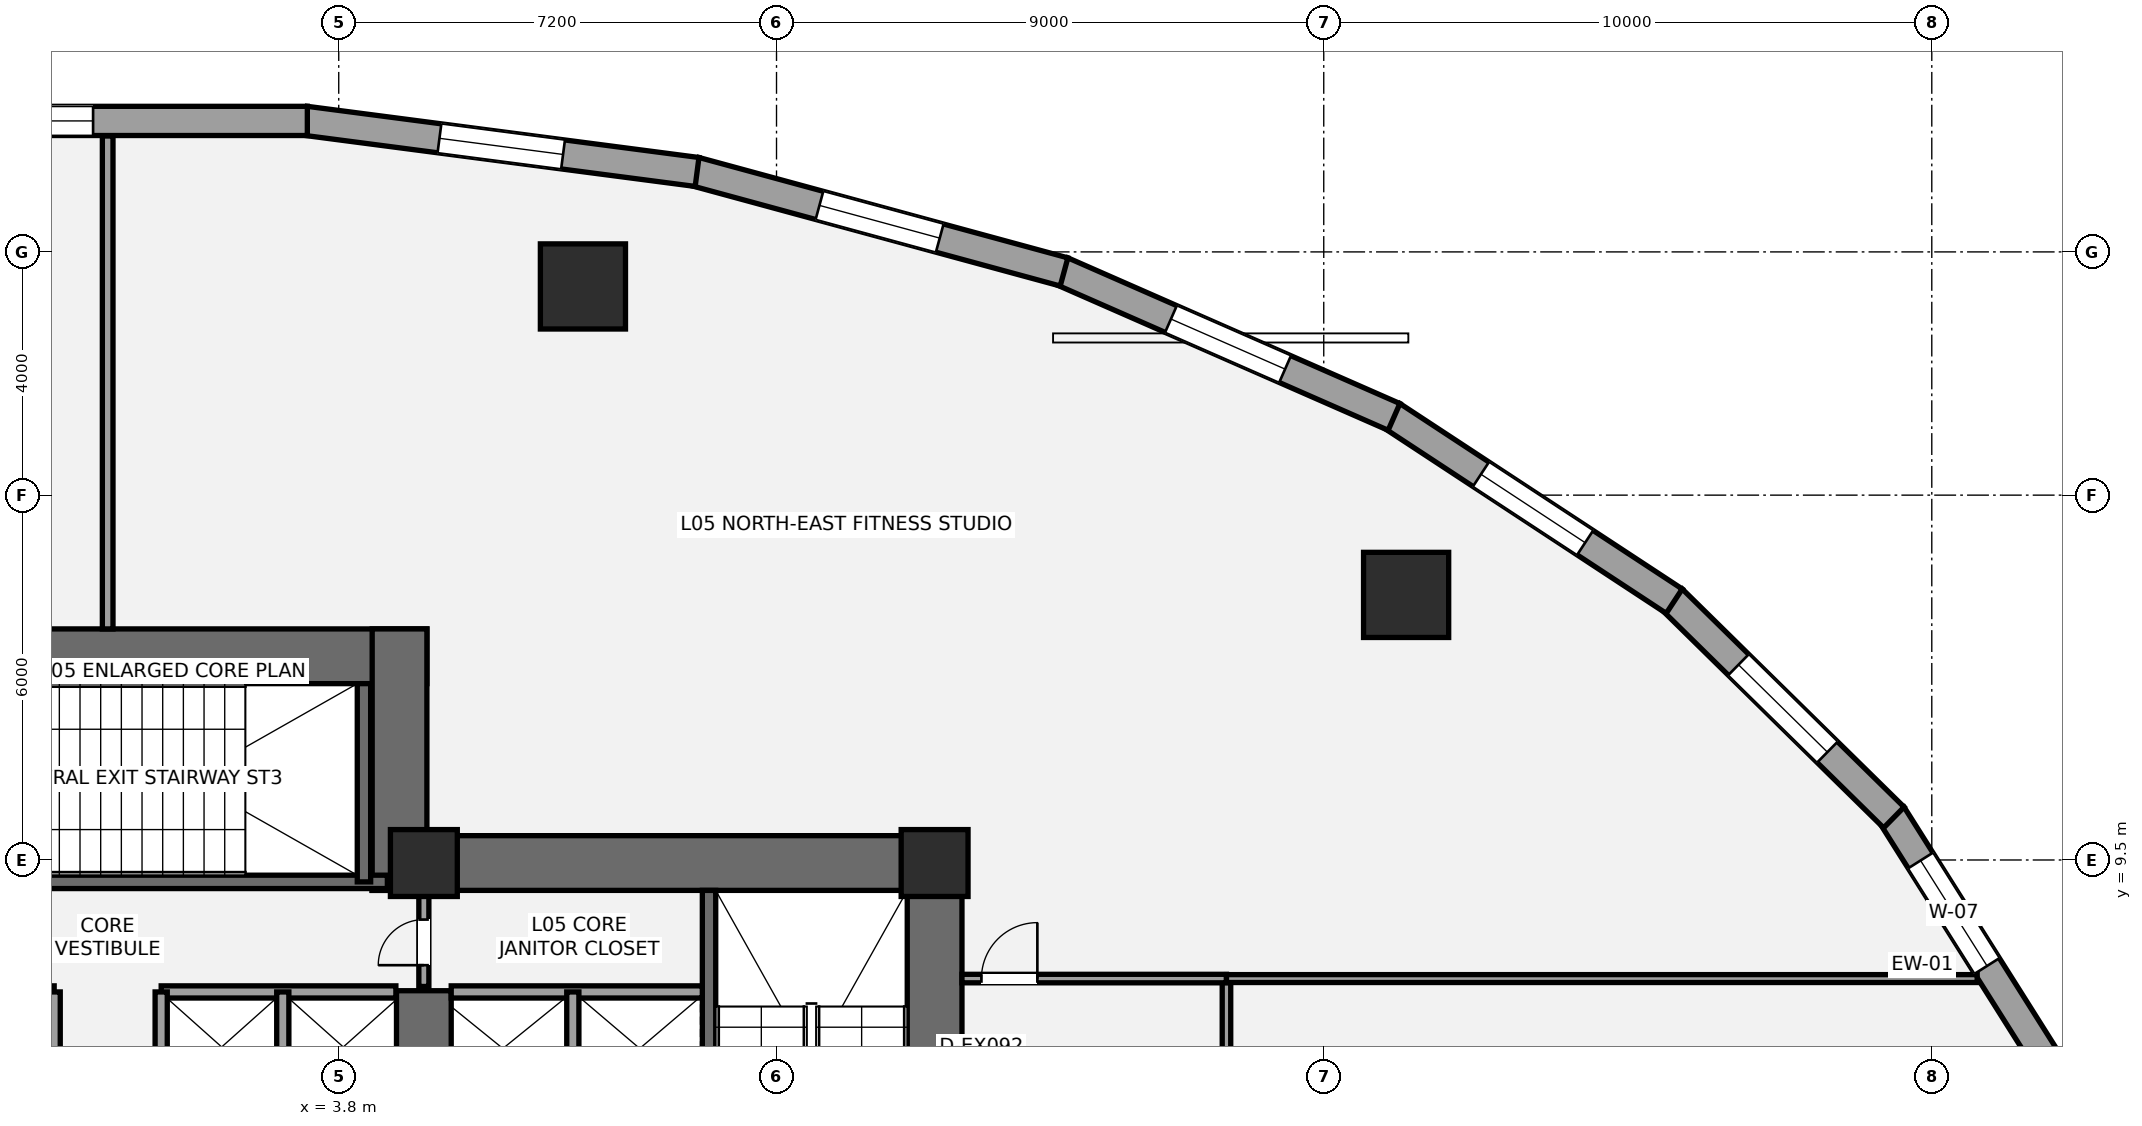
"""IFC4 building model, lengths in metres.
Left out: names, types, materials, properties, quantities, classifications, styles, units other than length and angle.
Written with IfcOpenShell. Run it as: python <this file> out.ifc"""

import sys

from ifc_helpers import new_model, si_unit, direction, frame, frame_2d, origin, origin_2d, place, context, subcontext, project, spatial, rectangle, hollow_circle, extrude, element, fill, save


model = new_model("IFC4")
c1 = context("Model", 3, precision=1e-05, world=origin(), true_north=direction((0.0, 1.0)))
c2 = subcontext(c1, "Body", "Model", "MODEL_VIEW")
j1 = project(units=[si_unit("LENGTHUNIT", "METRE"), si_unit("PLANEANGLEUNIT", "RADIAN")], contexts=[c1])
p1 = place(None, origin())
s1 = spatial("IfcSite", under=j1, at=p1, CompositionType="ELEMENT")
p2 = place(p1, origin())
s2 = spatial("IfcBuilding", under=s1, at=p2, CompositionType="ELEMENT")
p3 = place(p2, frame((0.0, 0.0, 22.8)))
s3 = spatial("IfcBuildingStorey", under=s2, at=p3, CompositionType="ELEMENT", Elevation=22.8)
p4 = place(p3, frame((13.6, 0.95, 0.0), z_axis=(0.0, 0.0, 1.0), x_axis=(0.0, 1.0, 0.0)))
e1 = element("IfcWall", 1, at=p4, inside=s3, PredefinedType="SHEAR", context=c2, shape_type="SweptSolid", body=[
    extrude(rectangle(XDim=8.95, YDim=0.9, at=frame_2d((4.475, 0.0))), origin(), (0.0, 0.0, 1.0), 4.2),
])
p5 = place(p3, frame((4.35, 9.45, 0.0), z_axis=(0.0, 0.0, 1.0), x_axis=(1.0, 0.0, 0.0)))
e2 = element("IfcWall", 2, at=p5, inside=s3, PredefinedType="SHEAR", context=c2, shape_type="SweptSolid", body=[
    extrude(rectangle(XDim=9.7, YDim=0.9, at=frame_2d((4.85, 0.0))), origin(), (0.0, 0.0, 1.0), 4.2),
])
p6 = place(p3, frame((5.2, 5.35, 0.0), z_axis=(0.0, 0.0, 1.0), x_axis=(0.0, 1.0, 0.0)))
e3 = element("IfcWall", 3, at=p6, inside=s3, PredefinedType="SHEAR", context=c2, shape_type="SweptSolid", body=[
    extrude(rectangle(XDim=2.0, YDim=0.9, at=frame_2d((1.0, 0.0))), origin(), (0.0, 0.0, 1.0), 4.2),
])
p7 = place(p3, frame((9.89, 1.85, 0.0), z_axis=(0.0, 0.0, 1.0), x_axis=(0.0, 1.0, 0.0)))
e4 = element("IfcWall", 4, at=p7, inside=s3, PredefinedType="SHEAR", context=c2, shape_type="SweptSolid", body=[
    extrude(rectangle(XDim=7.15, YDim=0.22, at=frame_2d((3.575, 0.0))), origin(), (0.0, 0.0, 1.0), 4.2),
])
p8 = place(p3, frame((-5.25, 12.85, 0.0), z_axis=(0.0, 0.0, 1.0), x_axis=(1.0, 0.0, 0.0)))
e5 = element("IfcWall", 5, at=p8, inside=s3, PredefinedType="SHEAR", context=c2, shape_type="SweptSolid", body=[
    extrude(rectangle(XDim=10.5, YDim=0.9, at=frame_2d((5.25, 0.0))), origin(), (0.0, 0.0, 1.0), 4.2),
])
p9 = place(p3, frame((4.8, 9.0, 0.0), z_axis=(0.0, 0.0, 1.0), x_axis=(0.0, 1.0, 0.0)))
e6 = element("IfcWall", 6, at=p9, inside=s3, PredefinedType="SHEAR", context=c2, shape_type="SweptSolid", body=[
    extrude(rectangle(XDim=4.3, YDim=0.9, at=frame_2d((2.15, 0.0))), origin(), (0.0, 0.0, 1.0), 4.2),
])
p10 = place(p3, frame((-4.7, 9.14, 0.0), z_axis=(0.0, 0.0, 1.0), x_axis=(1.0, 0.0, 0.0)))
e7 = element("IfcWall", 7, at=p10, inside=s3, PredefinedType="SHEAR", context=c2, shape_type="SweptSolid", body=[
    extrude(rectangle(XDim=9.3, YDim=0.22, at=frame_2d((4.65, 0.0))), origin(), (0.0, 0.0, 1.0), 4.2),
])
p11 = place(p10, frame((1.15, 0.0, 0.0)))
e8 = element("IfcOpeningElement", 8, at=p11, cuts=e7, PredefinedType="OPENING", context=c2, shape_type="SweptSolid", body=[
    extrude(rectangle(XDim=1.05, YDim=2.15, at=frame_2d((0.525, 1.075))), frame((0.0, 0.12, 0.0), z_axis=(0.0, -1.0, 0.0), x_axis=(1.0, 0.0, 0.0)), (0.0, 0.0, 1.0), 0.24),
])
p12 = place(p3, frame((4.215, 9.14, 0.0), z_axis=(0.0, 0.0, 1.0), x_axis=(0.0, 1.0, 0.0)))
e9 = element("IfcWall", 9, at=p12, inside=s3, PredefinedType="SHEAR", context=c2, shape_type="SweptSolid", body=[
    extrude(rectangle(XDim=3.26, YDim=0.22, at=frame_2d((1.63, 0.0))), origin(), (0.0, 0.0, 1.0), 4.2),
])
for number, where, z_axis, x_axis in (
    (10, (5.2, 9.45, 0.0), (0.0, 0.0, 1.0), (1.0, 0.0, 0.0)),
    (11, (13.6, 9.45, 0.0), (0.0, 0.0, 1.0), (1.0, 0.0, 0.0)),
):
    element("IfcColumn", number, at=place(p3, frame(where, z_axis=z_axis, x_axis=x_axis)), inside=s3, PredefinedType="COLUMN", context=c2, shape_type="SweptSolid", body=[
        extrude(rectangle(XDim=1.1, YDim=1.1, at=origin_2d()), origin(), (0.0, 0.0, 1.0), 4.2),
    ])
for number, where, z_axis, x_axis in (
    (12, (21.354, 13.859, 0.0), (0.0, 0.0, 1.0), (1.0, 0.0, 0.0)),
    (13, (7.816, 18.932, 0.0), (0.0, 0.0, 1.0), (1.0, 0.0, 0.0)),
):
    element("IfcColumn", number, at=place(p3, frame(where, z_axis=z_axis, x_axis=x_axis)), inside=s3, PredefinedType="USERDEFINED", context=c2, shape_type="SweptSolid", body=[
        extrude(hollow_circle(Radius=0.7, WallThickness=0.05, at=origin_2d()), origin(), (0.0, 0.0, 1.0), 4.13),
    ])
p13 = place(p3, frame((29.341, 10.243, 0.0), z_axis=(0.0, 0.0, 1.0), x_axis=(0.53349762721, -0.845801561693, 0.0)))
e14 = element("IfcWall", 14, at=p13, inside=s3, PredefinedType="STANDARD", context=c2, shape_type="SweptSolid", body=[
    extrude(rectangle(XDim=4.711, YDim=0.48, at=frame_2d((2.355, 0.0))), origin(), (0.0, 0.0, 1.0), 3.033),
])
p14 = place(p13, frame((0.888, 0.0, 0.72)))
e15 = element("IfcOpeningElement", 15, at=p14, cuts=e14, PredefinedType="OPENING", context=c2, shape_type="SweptSolid", body=[
    extrude(rectangle(XDim=2.05, YDim=1.8, at=frame_2d((1.025, 0.9))), frame((0.0, 0.25, 0.0), z_axis=(0.0, -1.0, 0.0), x_axis=(1.0, 0.0, 0.0)), (0.0, 0.0, 1.0), 0.5),
])
p15 = place(p3, frame((25.728, 13.785, 0.0), z_axis=(0.0, 0.0, 1.0), x_axis=(0.713189080178, -0.700971708355, 0.0)))
e16 = element("IfcWall", 16, at=p15, inside=s3, PredefinedType="STANDARD", context=c2, shape_type="SweptSolid", body=[
    extrude(rectangle(XDim=5.116, YDim=0.48, at=frame_2d((2.558, 0.0))), origin(), (0.0, 0.0, 1.0), 3.033),
])
p16 = place(p15, frame((1.533, 0.0, 0.72)))
e17 = element("IfcOpeningElement", 17, at=p16, cuts=e16, PredefinedType="OPENING", context=c2, shape_type="SweptSolid", body=[
    extrude(rectangle(XDim=2.05, YDim=1.8, at=frame_2d((1.025, 0.9))), frame((0.0, 0.25, 0.0), z_axis=(0.0, -1.0, 0.0), x_axis=(1.0, 0.0, 0.0)), (0.0, 0.0, 1.0), 0.5),
])
p17 = place(p3, frame((21.121, 16.806, 0.0), z_axis=(0.0, 0.0, 1.0), x_axis=(0.835863918172, -0.548936708827, 0.0)))
e18 = element("IfcWall", 18, at=p17, inside=s3, PredefinedType="STANDARD", context=c2, shape_type="SweptSolid", body=[
    extrude(rectangle(XDim=5.555, YDim=0.48, at=frame_2d((2.778, 0.0))), origin(), (0.0, 0.0, 1.0), 3.033),
])
p18 = place(p17, frame((1.753, 0.0, 0.72)))
e19 = element("IfcOpeningElement", 19, at=p18, cuts=e18, PredefinedType="OPENING", context=c2, shape_type="SweptSolid", body=[
    extrude(rectangle(XDim=2.05, YDim=1.8, at=frame_2d((1.025, 0.9))), frame((0.0, 0.25, 0.0), z_axis=(0.0, -1.0, 0.0), x_axis=(1.0, 0.0, 0.0)), (0.0, 0.0, 1.0), 0.5),
])
p19 = place(p3, frame((15.695, 19.183, 0.0), z_axis=(0.0, 0.0, 1.0), x_axis=(0.91570760638, -0.401845218484, 0.0)))
e20 = element("IfcWall", 20, at=p19, inside=s3, PredefinedType="STANDARD", context=c2, shape_type="SweptSolid", body=[
    extrude(rectangle(XDim=5.963, YDim=0.48, at=frame_2d((2.981, 0.0))), origin(), (0.0, 0.0, 1.0), 3.033),
])
p20 = place(p19, frame((1.957, 0.0, 0.72)))
e21 = element("IfcOpeningElement", 21, at=p20, cuts=e20, PredefinedType="OPENING", context=c2, shape_type="SweptSolid", body=[
    extrude(rectangle(XDim=2.05, YDim=1.8, at=frame_2d((1.025, 0.9))), frame((0.0, 0.25, 0.0), z_axis=(0.0, -1.0, 0.0), x_axis=(1.0, 0.0, 0.0)), (0.0, 0.0, 1.0), 0.5),
])
p21 = place(p3, frame((9.662, 20.821, 0.0), z_axis=(0.0, 0.0, 1.0), x_axis=(0.964936550718, -0.262483243445, 0.0)))
e22 = element("IfcWall", 22, at=p21, inside=s3, PredefinedType="STANDARD", context=c2, shape_type="SweptSolid", body=[
    extrude(rectangle(XDim=6.288, YDim=0.48, at=frame_2d((3.144, 0.0))), origin(), (0.0, 0.0, 1.0), 3.033),
])
p22 = place(p21, frame((2.119, 0.0, 0.72)))
e23 = element("IfcOpeningElement", 23, at=p22, cuts=e22, PredefinedType="OPENING", context=c2, shape_type="SweptSolid", body=[
    extrude(rectangle(XDim=2.05, YDim=1.8, at=frame_2d((1.025, 0.9))), frame((0.0, 0.25, 0.0), z_axis=(0.0, -1.0, 0.0), x_axis=(1.0, 0.0, 0.0)), (0.0, 0.0, 1.0), 0.5),
])
p23 = place(p3, frame((3.252, 21.656, 0.0), z_axis=(0.0, 0.0, 1.0), x_axis=(0.991576921472, -0.129519144545, 0.0)))
e24 = element("IfcWall", 24, at=p23, inside=s3, PredefinedType="STANDARD", context=c2, shape_type="SweptSolid", body=[
    extrude(rectangle(XDim=6.496, YDim=0.48, at=frame_2d((3.248, 0.0))), origin(), (0.0, 0.0, 1.0), 3.033),
])
p24 = place(p23, frame((2.223, 0.0, 0.72)))
e25 = element("IfcOpeningElement", 25, at=p24, cuts=e24, PredefinedType="OPENING", context=c2, shape_type="SweptSolid", body=[
    extrude(rectangle(XDim=2.05, YDim=1.8, at=frame_2d((1.025, 0.9))), frame((0.0, 0.25, 0.0), z_axis=(0.0, -1.0, 0.0), x_axis=(1.0, 0.0, 0.0)), (0.0, 0.0, 1.0), 0.5),
])
p25 = place(p3, frame((-3.284, 21.654, 0.0), z_axis=(0.0, 0.0, 1.0), x_axis=(1.0, 0.0, 0.0)))
e26 = element("IfcWall", 26, at=p25, inside=s3, PredefinedType="STANDARD", context=c2, shape_type="SweptSolid", body=[
    extrude(rectangle(XDim=6.567, YDim=0.48, at=frame_2d((3.284, 0.0))), origin(), (0.0, 0.0, 1.0), 3.033),
])
p26 = place(p25, frame((0.994, 0.0, 0.72)))
e27 = element("IfcOpeningElement", 27, at=p26, cuts=e26, PredefinedType="OPENING", context=c2, shape_type="SweptSolid", body=[
    extrude(rectangle(XDim=2.05, YDim=1.8, at=frame_2d((1.025, 0.9))), frame((0.0, 0.25, 0.0), z_axis=(0.0, -1.0, 0.0), x_axis=(1.0, 0.0, 0.0)), (0.0, 0.0, 1.0), 0.5),
])
p27 = place(p3, frame((5.65, 7.33, 0.0), z_axis=(0.0, 0.0, 1.0), x_axis=(1.0, 0.0, 0.0)))
e28 = element("IfcWall", 28, at=p27, inside=s3, PredefinedType="SOLIDWALL", context=c2, shape_type="SweptSolid", body=[
    extrude(rectangle(XDim=4.13, YDim=0.2, at=frame_2d((2.065, 0.0))), origin(), (0.0, 0.0, 1.0), 3.9),
])
p28 = place(p3, frame((7.65, 5.47, 0.0), z_axis=(0.0, 0.0, 1.0), x_axis=(0.0, 1.0, 0.0)))
e29 = element("IfcWall", 29, at=p28, inside=s3, PredefinedType="SOLIDWALL", context=c2, shape_type="SweptSolid", body=[
    extrude(rectangle(XDim=1.86, YDim=0.2, at=frame_2d((0.93, 0.0))), origin(), (0.0, 0.0, 1.0), 3.9),
])
for number, where, z_axis, x_axis in (
    (30, (-4.74, 7.33, 0.0), (0.0, 0.0, 1.0), (1.0, 0.0, 0.0)),
    (31, (0.88, 7.33, 0.0), (0.0, 0.0, 1.0), (1.0, 0.0, 0.0)),
):
    element("IfcWall", number, at=place(p3, frame(where, z_axis=z_axis, x_axis=x_axis)), inside=s3, PredefinedType="SOLIDWALL", context=c2, shape_type="SweptSolid", body=[
        extrude(rectangle(XDim=3.86, YDim=0.2, at=frame_2d((1.93, 0.0))), origin(), (0.0, 0.0, 1.0), 3.9),
    ])
for number, where, z_axis, x_axis in (
    (32, (2.88, 5.52, 0.0), (0.0, 0.0, 1.0), (0.0, 1.0, 0.0)),
    (33, (-0.88, 5.52, 0.0), (0.0, 0.0, 1.0), (0.0, 1.0, 0.0)),
    (34, (0.88, 5.52, 0.0), (0.0, 0.0, 1.0), (0.0, 1.0, 0.0)),
):
    element("IfcWall", number, at=place(p3, frame(where, z_axis=z_axis, x_axis=x_axis)), inside=s3, PredefinedType="SOLIDWALL", context=c2, shape_type="SweptSolid", body=[
        extrude(rectangle(XDim=1.81, YDim=0.2, at=frame_2d((0.905, 0.0))), origin(), (0.0, 0.0, 1.0), 3.9),
    ])
p29 = place(p3, frame((5.2, 7.42, 0.0), z_axis=(0.0, 0.0, 1.0), x_axis=(0.0, 1.0, 0.0)))
e35 = element("IfcWall", 35, at=p29, inside=s3, PredefinedType="PARTITIONING", context=c2, shape_type="SweptSolid", body=[
    extrude(rectangle(XDim=1.58, YDim=0.165, at=frame_2d((0.79, 0.0))), origin(), (0.0, 0.0, 1.0), 3.9),
])
p30 = place(p29, frame((0.35, 0.0, 0.0)))
e36 = element("IfcOpeningElement", 36, at=p30, cuts=e35, PredefinedType="OPENING", context=c2, shape_type="SweptSolid", body=[
    extrude(rectangle(XDim=0.75, YDim=2.1, at=frame_2d((0.375, 1.05))), frame((0.0, 0.093, 0.0), z_axis=(0.0, -1.0, 0.0), x_axis=(1.0, 0.0, 0.0)), (0.0, 0.0, 1.0), 0.185),
])
p31 = place(p3, frame((18.4, -17.725, 0.0), z_axis=(0.0, 0.0, 1.0), x_axis=(0.0, 1.0, 0.0)))
e37 = element("IfcWall", 37, at=p31, inside=s3, PredefinedType="PARTITIONING", context=c2, shape_type="SweptSolid", body=[
    extrude(rectangle(XDim=25.275, YDim=0.14, at=frame_2d((12.637, 0.0))), origin(), (0.0, 0.0, 1.0), 2.09),
])
p32 = place(p31, frame((15.225, 0.0, 0.0)))
e38 = element("IfcOpeningElement", 38, at=p32, cuts=e37, PredefinedType="OPENING", context=c2, shape_type="SweptSolid", body=[
    extrude(rectangle(XDim=0.85, YDim=2.0, at=frame_2d((0.425, 1.0))), frame((0.0, 0.08, 0.0), z_axis=(0.0, -1.0, 0.0), x_axis=(1.0, 0.0, 0.0)), (0.0, 0.0, 1.0), 0.16),
])
p33 = place(p31, frame((22.05, 0.0, 0.0)))
e39 = element("IfcOpeningElement", 39, at=p33, cuts=e37, PredefinedType="OPENING", context=c2, shape_type="SweptSolid", body=[
    extrude(rectangle(XDim=0.85, YDim=2.0, at=frame_2d((0.425, 1.0))), frame((0.0, 0.08, 0.0), z_axis=(0.0, -1.0, 0.0), x_axis=(1.0, 0.0, 0.0)), (0.0, 0.0, 1.0), 0.16),
])
p34 = place(p3, frame((14.05, 7.55, 0.0), z_axis=(0.0, 0.0, 1.0), x_axis=(1.0, 0.0, 0.0)))
e40 = element("IfcWall", 40, at=p34, inside=s3, PredefinedType="PARTITIONING", context=c2, shape_type="SweptSolid", body=[
    extrude(rectangle(XDim=4.35, YDim=0.14, at=frame_2d((2.175, 0.0))), origin(), (0.0, 0.0, 1.0), 3.9),
])
p35 = place(p34, frame((0.32, 0.0, 0.0)))
e41 = element("IfcOpeningElement", 41, at=p35, cuts=e40, PredefinedType="OPENING", context=c2, shape_type="SweptSolid", body=[
    extrude(rectangle(XDim=0.92, YDim=2.15, at=frame_2d((0.46, 1.075))), frame((0.0, 0.08, 0.0), z_axis=(0.0, -1.0, 0.0), x_axis=(1.0, 0.0, 0.0)), (0.0, 0.0, 1.0), 0.16),
])
p36 = place(p3, frame((0.0, 13.3, 0.0), z_axis=(0.0, 0.0, 1.0), x_axis=(0.0, 1.0, 0.0)))
e42 = element("IfcWall", 42, at=p36, inside=s3, PredefinedType="PARTITIONING", context=c2, shape_type="SweptSolid", body=[
    extrude(rectangle(XDim=8.106, YDim=0.175, at=frame_2d((4.053, 0.0))), origin(), (0.0, 0.0, 1.0), 2.09),
])
p37 = place(p3, frame((18.4, 7.55, 0.0), z_axis=(0.0, 0.0, 1.0), x_axis=(1.0, 0.0, 0.0)))
e43 = element("IfcWall", 43, at=p37, inside=s3, PredefinedType="PARTITIONING", context=c2, shape_type="SweptSolid", body=[
    extrude(rectangle(XDim=12.347, YDim=0.13, at=frame_2d((6.173, 0.0))), origin(), (0.0, 0.0, 1.0), 2.09),
])
p38 = place(p14, origin())
e44 = element("IfcWindow", 44, at=p38, inside=s3, PartitioningType="SINGLE_PANEL", PredefinedType="WINDOW", context=c2, shape_type="SweptSolid", body=[
    extrude(rectangle(XDim=2.05, YDim=1.8, at=frame_2d((1.025, 0.9))), frame((0.0, -0.01, 0.0), z_axis=(0.0, -1.0, 0.0), x_axis=(1.0, 0.0, 0.0)), (0.0, 0.0, 1.0), 0.06),
])
fill(e15, e44)
p39 = place(p16, origin())
e45 = element("IfcWindow", 45, at=p39, inside=s3, PartitioningType="SINGLE_PANEL", PredefinedType="WINDOW", context=c2, shape_type="SweptSolid", body=[
    extrude(rectangle(XDim=2.05, YDim=1.8, at=frame_2d((1.025, 0.9))), frame((0.0, -0.01, 0.0), z_axis=(0.0, -1.0, 0.0), x_axis=(1.0, 0.0, 0.0)), (0.0, 0.0, 1.0), 0.06),
])
fill(e17, e45)
p40 = place(p18, origin())
e46 = element("IfcWindow", 46, at=p40, inside=s3, PartitioningType="SINGLE_PANEL", PredefinedType="WINDOW", context=c2, shape_type="SweptSolid", body=[
    extrude(rectangle(XDim=2.05, YDim=1.8, at=frame_2d((1.025, 0.9))), frame((0.0, -0.01, 0.0), z_axis=(0.0, -1.0, 0.0), x_axis=(1.0, 0.0, 0.0)), (0.0, 0.0, 1.0), 0.06),
])
fill(e19, e46)
p41 = place(p20, origin())
e47 = element("IfcWindow", 47, at=p41, inside=s3, PartitioningType="SINGLE_PANEL", PredefinedType="WINDOW", context=c2, shape_type="SweptSolid", body=[
    extrude(rectangle(XDim=2.05, YDim=1.8, at=frame_2d((1.025, 0.9))), frame((0.0, -0.01, 0.0), z_axis=(0.0, -1.0, 0.0), x_axis=(1.0, 0.0, 0.0)), (0.0, 0.0, 1.0), 0.06),
])
fill(e21, e47)
p42 = place(p22, origin())
e48 = element("IfcWindow", 48, at=p42, inside=s3, PartitioningType="SINGLE_PANEL", PredefinedType="WINDOW", context=c2, shape_type="SweptSolid", body=[
    extrude(rectangle(XDim=2.05, YDim=1.8, at=frame_2d((1.025, 0.9))), frame((0.0, -0.01, 0.0), z_axis=(0.0, -1.0, 0.0), x_axis=(1.0, 0.0, 0.0)), (0.0, 0.0, 1.0), 0.06),
])
fill(e23, e48)
p43 = place(p24, origin())
e49 = element("IfcWindow", 49, at=p43, inside=s3, PartitioningType="SINGLE_PANEL", PredefinedType="WINDOW", context=c2, shape_type="SweptSolid", body=[
    extrude(rectangle(XDim=2.05, YDim=1.8, at=frame_2d((1.025, 0.9))), frame((0.0, -0.01, 0.0), z_axis=(0.0, -1.0, 0.0), x_axis=(1.0, 0.0, 0.0)), (0.0, 0.0, 1.0), 0.06),
])
fill(e25, e49)
p44 = place(p26, origin())
e50 = element("IfcWindow", 50, at=p44, inside=s3, PartitioningType="SINGLE_PANEL", PredefinedType="WINDOW", context=c2, shape_type="SweptSolid", body=[
    extrude(rectangle(XDim=2.05, YDim=1.8, at=frame_2d((1.025, 0.9))), frame((0.0, -0.01, 0.0), z_axis=(0.0, -1.0, 0.0), x_axis=(1.0, 0.0, 0.0)), (0.0, 0.0, 1.0), 0.06),
])
fill(e27, e50)
p45 = place(p30, origin())
e51 = element("IfcDoor", 51, at=p45, inside=s3, OperationType="SINGLE_SWING_LEFT", PredefinedType="DOOR", context=c2, shape_type="SweptSolid", body=[
    extrude(rectangle(XDim=0.75, YDim=2.1, at=frame_2d((0.375, 1.05))), frame((0.0, 0.025, 0.0), z_axis=(0.0, -1.0, 0.0), x_axis=(1.0, 0.0, 0.0)), (0.0, 0.0, 1.0), 0.05),
])
fill(e36, e51)
p46 = place(p35, origin())
e52 = element("IfcDoor", 52, at=p46, inside=s3, OperationType="SINGLE_SWING_RIGHT", PredefinedType="DOOR", context=c2, shape_type="SweptSolid", body=[
    extrude(rectangle(XDim=0.92, YDim=2.15, at=frame_2d((0.46, 1.075))), frame((0.0, 0.025, 0.0), z_axis=(0.0, -1.0, 0.0), x_axis=(1.0, 0.0, 0.0)), (0.0, 0.0, 1.0), 0.05),
])
fill(e41, e52)
save(model, sys.argv[1])
